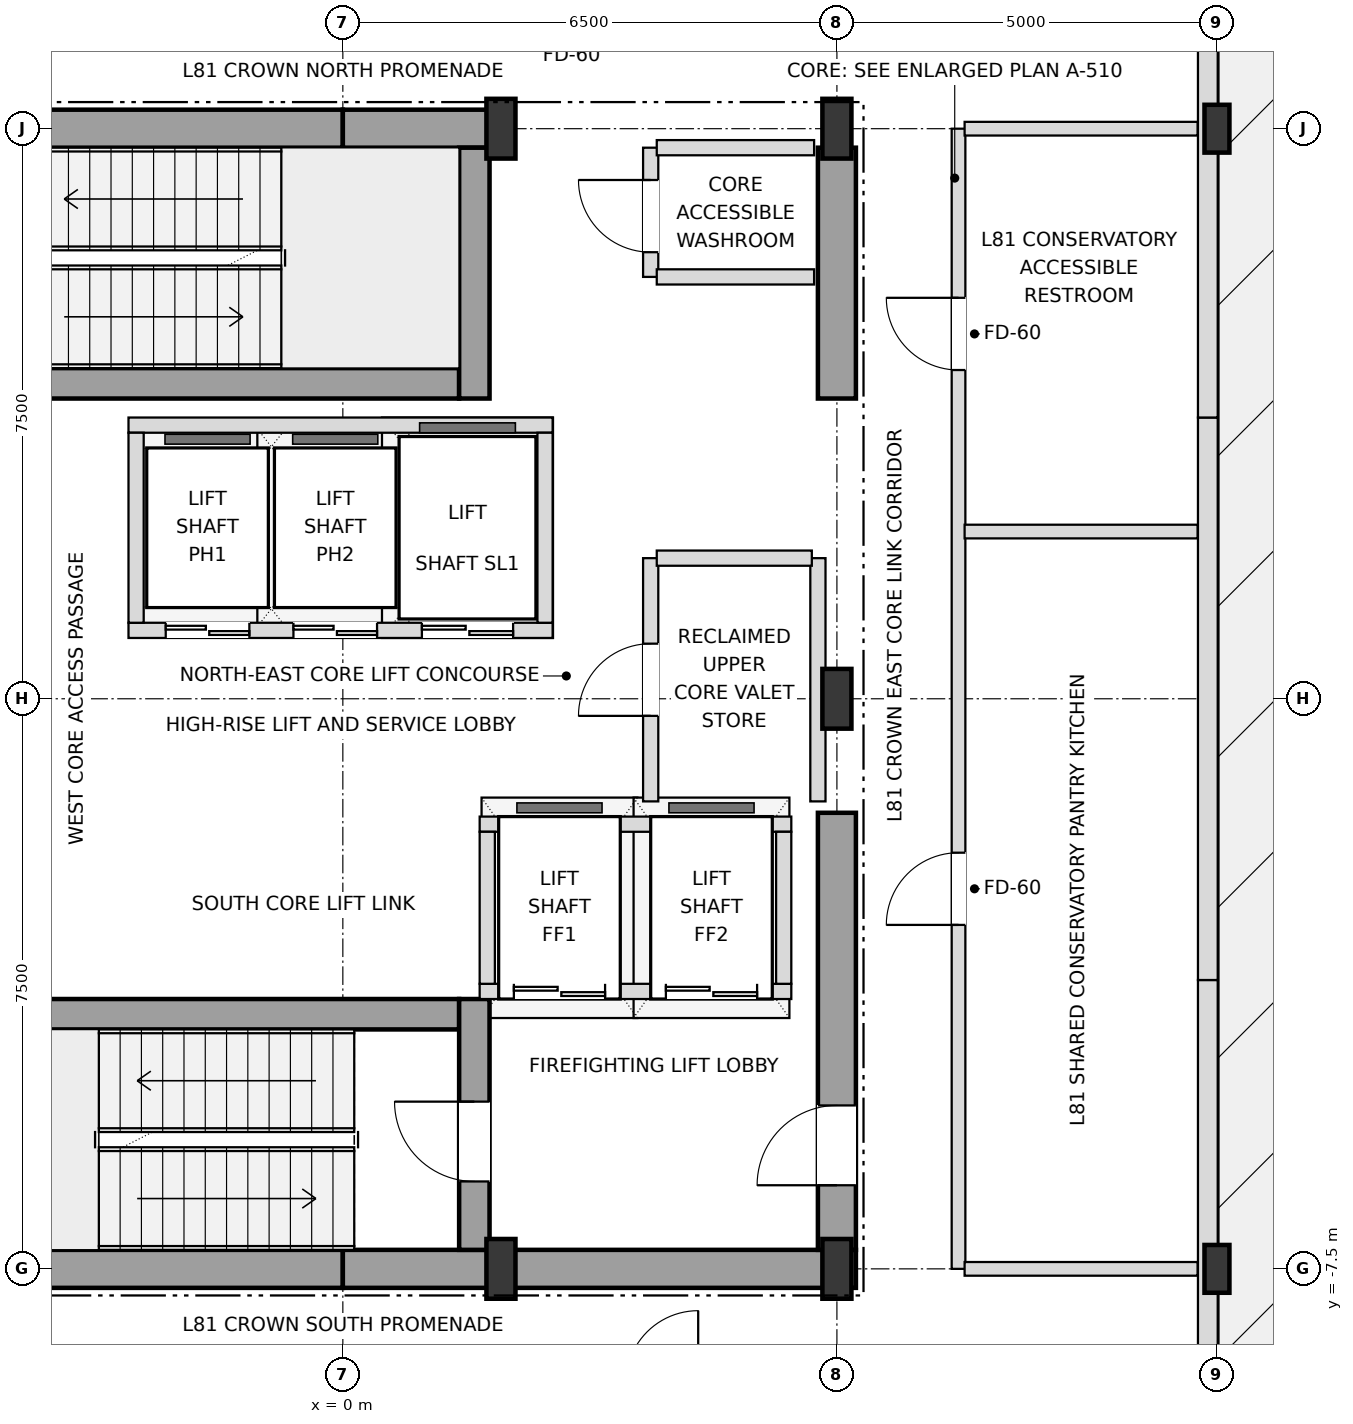
"""IFC4 building model, lengths in metres.
Left out: names, types, materials, properties, quantities, classifications, styles, units other than length and angle.
Written with IfcOpenShell. Run it as: python <this file> out.ifc"""

import sys

from ifc_helpers import new_model, si_unit, direction, frame, frame_2d, origin, origin_2d, place, context, subcontext, project, spatial, rectangle, i_section, extrude, element, fill, save


model = new_model("IFC4")
c1 = context("Model", 3, precision=1e-05, world=origin(), true_north=direction((0.0, 1.0)))
c2 = subcontext(c1, "Body", "Model", "MODEL_VIEW")
j1 = project(units=[si_unit("LENGTHUNIT", "METRE"), si_unit("PLANEANGLEUNIT", "RADIAN")], contexts=[c1])
p1 = place(None, origin())
s1 = spatial("IfcSite", under=j1, at=p1, CompositionType="ELEMENT")
p2 = place(p1, origin())
s2 = spatial("IfcBuilding", under=s1, at=p2, CompositionType="ELEMENT")
p3 = place(p2, frame((0.0, 0.0, 309.9)))
s3 = spatial("IfcBuildingStorey", under=s2, at=p3, CompositionType="ELEMENT", Elevation=309.9)
for number, where, z_axis, x_axis in (
    (1, (2.08, -7.5, 0.0), (0.0, 0.0, 1.0), (1.0, 0.0, 0.0)),
    (2, (6.5, -7.5, 0.0), (0.0, 0.0, 1.0), (1.0, 0.0, 0.0)),
    (3, (6.5, 0.0, 0.0), (0.0, 0.0, 1.0), (1.0, 0.0, 0.0)),
    (4, (2.08, 7.5, 0.0), (0.0, 0.0, 1.0), (1.0, 0.0, 0.0)),
    (5, (6.5, 7.5, 0.0), (0.0, 0.0, 1.0), (1.0, 0.0, 0.0)),
):
    element("IfcColumn", number, at=place(p3, frame(where, z_axis=z_axis, x_axis=x_axis)), inside=s3, PredefinedType="COLUMN", context=c2, shape_type="SweptSolid", body=[
        extrude(i_section(OverallWidth=0.382, OverallDepth=0.786, WebThickness=0.02, FlangeThickness=0.033, at=origin_2d()), origin(), (0.0, 0.0, 1.0), 4.5),
    ])
for number, where, z_axis, x_axis in (
    (6, (11.5, -7.5, 0.0), (0.0, 0.0, 1.0), (1.0, 0.0, 0.0)),
    (7, (11.5, 7.5, 0.0), (0.0, 0.0, 1.0), (1.0, 0.0, 0.0)),
):
    element("IfcColumn", number, at=place(p3, frame(where, z_axis=z_axis, x_axis=x_axis)), inside=s3, PredefinedType="COLUMN", context=c2, shape_type="SweptSolid", body=[
        extrude(i_section(OverallWidth=0.328, OverallDepth=0.629, WebThickness=0.014, FlangeThickness=0.021, at=origin_2d()), origin(), (0.0, 0.0, 1.0), 4.5),
    ])
p4 = place(p3, frame((11.38, -11.2, 0.0), z_axis=(0.0, 0.0, 1.0), x_axis=(0.0, 1.0, 0.0)))
e8 = element("IfcWall", 8, at=p4, inside=s3, PredefinedType="SOLIDWALL", context=c2, shape_type="SweptSolid", body=[
    extrude(rectangle(XDim=7.5, YDim=0.26, at=frame_2d((3.75, 0.0))), origin(), (0.0, 0.0, 1.0), 3.918),
])
p5 = place(p3, frame((11.38, -3.7, 0.0), z_axis=(0.0, 0.0, 1.0), x_axis=(0.0, 1.0, 0.0)))
e9 = element("IfcWall", 9, at=p5, inside=s3, PredefinedType="SOLIDWALL", context=c2, shape_type="SweptSolid", body=[
    extrude(rectangle(XDim=7.4, YDim=0.26, at=frame_2d((3.7, 0.0))), origin(), (0.0, 0.0, 1.0), 3.918),
])
p6 = place(p3, frame((11.38, 3.7, 0.0), z_axis=(0.0, 0.0, 1.0), x_axis=(0.0, 1.0, 0.0)))
e10 = element("IfcWall", 10, at=p6, inside=s3, PredefinedType="SOLIDWALL", context=c2, shape_type="SweptSolid", body=[
    extrude(rectangle(XDim=7.5, YDim=0.26, at=frame_2d((3.75, 0.0))), origin(), (0.0, 0.0, 1.0), 3.918),
])
for number, where, z_axis, x_axis in (
    (11, (-6.75, -7.5, 0.0), (0.0, 0.0, 1.0), (1.0, 0.0, 0.0)),
    (12, (0.0, -7.5, 0.0), (0.0, 0.0, 1.0), (1.0, 0.0, 0.0)),
):
    element("IfcWall", number, at=place(p3, frame(where, z_axis=z_axis, x_axis=x_axis)), inside=s3, PredefinedType="SHEAR", context=c2, shape_type="SweptSolid", body=[
        extrude(rectangle(XDim=6.75, YDim=0.5, at=frame_2d((3.375, 0.0))), origin(), (0.0, 0.0, 1.0), 4.25),
    ])
p7 = place(p3, frame((-6.75, 7.5, 0.0), z_axis=(0.0, 0.0, 1.0), x_axis=(1.0, 0.0, 0.0)))
e13 = element("IfcWall", 13, at=p7, inside=s3, PredefinedType="SHEAR", context=c2, shape_type="SweptSolid", body=[
    extrude(rectangle(XDim=6.75, YDim=0.5, at=frame_2d((3.375, 0.0))), origin(), (0.0, 0.0, 1.0), 4.25),
])
p8 = place(p7, frame((1.65, 0.0, 0.0)))
e14 = element("IfcOpeningElement", 14, at=p8, cuts=e13, PredefinedType="OPENING", context=c2, shape_type="SweptSolid", body=[
    extrude(rectangle(XDim=1.05, YDim=2.15, at=frame_2d((0.525, 1.075))), frame((0.0, 0.26, 0.0), z_axis=(0.0, -1.0, 0.0), x_axis=(1.0, 0.0, 0.0)), (0.0, 0.0, 1.0), 0.52),
])
p9 = place(p3, frame((0.0, 7.5, 0.0), z_axis=(0.0, 0.0, 1.0), x_axis=(1.0, 0.0, 0.0)))
e15 = element("IfcWall", 15, at=p9, inside=s3, PredefinedType="SHEAR", context=c2, shape_type="SweptSolid", body=[
    extrude(rectangle(XDim=2.08, YDim=0.5, at=frame_2d((1.04, 0.0))), origin(), (0.0, 0.0, 1.0), 4.25),
])
p10 = place(p3, frame((6.5, -7.25, 0.0), z_axis=(0.0, 0.0, 1.0), x_axis=(0.0, 1.0, 0.0)))
e16 = element("IfcWall", 16, at=p10, inside=s3, PredefinedType="SHEAR", context=c2, shape_type="SweptSolid", body=[
    extrude(rectangle(XDim=5.75, YDim=0.5, at=frame_2d((2.875, 0.0))), origin(), (0.0, 0.0, 1.0), 4.25),
])
p11 = place(p10, frame((0.85, 0.0, 0.0)))
e17 = element("IfcOpeningElement", 17, at=p11, cuts=e16, PredefinedType="OPENING", context=c2, shape_type="SweptSolid", body=[
    extrude(rectangle(XDim=1.05, YDim=2.15, at=frame_2d((0.525, 1.075))), frame((0.0, 0.26, 0.0), z_axis=(0.0, -1.0, 0.0), x_axis=(1.0, 0.0, 0.0)), (0.0, 0.0, 1.0), 0.52),
])
p12 = place(p3, frame((6.5, 3.95, 0.0), z_axis=(0.0, 0.0, 1.0), x_axis=(0.0, 1.0, 0.0)))
e18 = element("IfcWall", 18, at=p12, inside=s3, PredefinedType="SHEAR", context=c2, shape_type="SweptSolid", body=[
    extrude(rectangle(XDim=3.3, YDim=0.5, at=frame_2d((1.65, 0.0))), origin(), (0.0, 0.0, 1.0), 4.25),
])
p13 = place(p3, frame((-6.25, -4.15, 0.0), z_axis=(0.0, 0.0, 1.0), x_axis=(1.0, 0.0, 0.0)))
e19 = element("IfcWall", 19, at=p13, inside=s3, PredefinedType="SHEAR", context=c2, shape_type="SweptSolid", body=[
    extrude(rectangle(XDim=7.78, YDim=0.4, at=frame_2d((3.89, 0.0))), origin(), (0.0, 0.0, 1.0), 4.25),
])
p14 = place(p3, frame((1.73, -7.25, 0.0), z_axis=(0.0, 0.0, 1.0), x_axis=(0.0, 1.0, 0.0)))
e20 = element("IfcWall", 20, at=p14, inside=s3, PredefinedType="SHEAR", context=c2, shape_type="SweptSolid", body=[
    extrude(rectangle(XDim=3.3, YDim=0.4, at=frame_2d((1.65, 0.0))), origin(), (0.0, 0.0, 1.0), 4.25),
])
p15 = place(p14, frame((0.9, 0.0, 0.0)))
e21 = element("IfcOpeningElement", 21, at=p15, cuts=e20, PredefinedType="OPENING", context=c2, shape_type="SweptSolid", body=[
    extrude(rectangle(XDim=1.05, YDim=2.15, at=frame_2d((0.525, 1.075))), frame((0.0, 0.21, 0.0), z_axis=(0.0, -1.0, 0.0), x_axis=(1.0, 0.0, 0.0)), (0.0, 0.0, 1.0), 0.42),
])
p16 = place(p3, frame((-5.55, 4.15, 0.0), z_axis=(0.0, 0.0, 1.0), x_axis=(1.0, 0.0, 0.0)))
e22 = element("IfcWall", 22, at=p16, inside=s3, PredefinedType="SHEAR", context=c2, shape_type="SweptSolid", body=[
    extrude(rectangle(XDim=7.08, YDim=0.4, at=frame_2d((3.54, 0.0))), origin(), (0.0, 0.0, 1.0), 4.25),
])
p17 = place(p3, frame((1.73, 3.95, 0.0), z_axis=(0.0, 0.0, 1.0), x_axis=(0.0, 1.0, 0.0)))
e23 = element("IfcWall", 23, at=p17, inside=s3, PredefinedType="SHEAR", context=c2, shape_type="SweptSolid", body=[
    extrude(rectangle(XDim=3.3, YDim=0.4, at=frame_2d((1.65, 0.0))), origin(), (0.0, 0.0, 1.0), 4.25),
])
p18 = place(p3, frame((-2.82, 0.9, 0.0), z_axis=(0.0, 0.0, 1.0), x_axis=(1.0, 0.0, 0.0)))
e24 = element("IfcWall", 24, at=p18, inside=s3, PredefinedType="SOLIDWALL", context=c2, shape_type="SweptSolid", body=[
    extrude(rectangle(XDim=5.58, YDim=0.2, at=frame_2d((2.79, 0.0))), origin(), (0.0, 0.0, 1.0), 4.25),
])
p19 = place(p18, frame((0.49, 0.0, 0.0)))
e25 = element("IfcOpeningElement", 25, at=p19, cuts=e24, PredefinedType="OPENING", context=c2, shape_type="SweptSolid", body=[
    extrude(rectangle(XDim=1.1, YDim=2.15, at=frame_2d((0.55, 1.075))), frame((0.0, 0.11, 0.0), z_axis=(0.0, -1.0, 0.0), x_axis=(1.0, 0.0, 0.0)), (0.0, 0.0, 1.0), 0.22),
])
p20 = place(p18, frame((2.17, 0.0, 0.0)))
e26 = element("IfcOpeningElement", 26, at=p20, cuts=e24, PredefinedType="OPENING", context=c2, shape_type="SweptSolid", body=[
    extrude(rectangle(XDim=1.1, YDim=2.15, at=frame_2d((0.55, 1.075))), frame((0.0, 0.11, 0.0), z_axis=(0.0, -1.0, 0.0), x_axis=(1.0, 0.0, 0.0)), (0.0, 0.0, 1.0), 0.22),
])
p21 = place(p18, frame((3.86, 0.0, 0.0)))
e27 = element("IfcOpeningElement", 27, at=p21, cuts=e24, PredefinedType="OPENING", context=c2, shape_type="SweptSolid", body=[
    extrude(rectangle(XDim=1.2, YDim=2.2, at=frame_2d((0.6, 1.1))), frame((0.0, 0.11, 0.0), z_axis=(0.0, -1.0, 0.0), x_axis=(1.0, 0.0, 0.0)), (0.0, 0.0, 1.0), 0.22),
])
p22 = place(p3, frame((-2.82, 3.6, 0.0), z_axis=(0.0, 0.0, 1.0), x_axis=(1.0, 0.0, 0.0)))
e28 = element("IfcWall", 28, at=p22, inside=s3, PredefinedType="SOLIDWALL", context=c2, shape_type="SweptSolid", body=[
    extrude(rectangle(XDim=5.58, YDim=0.2, at=frame_2d((2.79, 0.0))), origin(), (0.0, 0.0, 1.0), 4.25),
])
for number, where, z_axis, x_axis in (
    (29, (-2.72, 1.0, 0.0), (0.0, 0.0, 1.0), (0.0, 1.0, 0.0)),
    (30, (2.66, 1.0, 0.0), (0.0, 0.0, 1.0), (0.0, 1.0, 0.0)),
):
    element("IfcWall", number, at=place(p3, frame(where, z_axis=z_axis, x_axis=x_axis)), inside=s3, PredefinedType="SOLIDWALL", context=c2, shape_type="SweptSolid", body=[
        extrude(rectangle(XDim=2.5, YDim=0.2, at=frame_2d((1.25, 0.0))), origin(), (0.0, 0.0, 1.0), 4.25),
    ])
p23 = place(p3, frame((1.8, -3.85, 0.0), z_axis=(0.0, 0.0, 1.0), x_axis=(1.0, 0.0, 0.0)))
e31 = element("IfcWall", 31, at=p23, inside=s3, PredefinedType="SOLIDWALL", context=c2, shape_type="SweptSolid", body=[
    extrude(rectangle(XDim=4.1, YDim=0.2, at=frame_2d((2.05, 0.0))), origin(), (0.0, 0.0, 1.0), 4.25),
])
p24 = place(p23, frame((0.45, 0.0, 0.0)))
e32 = element("IfcOpeningElement", 32, at=p24, cuts=e31, PredefinedType="OPENING", context=c2, shape_type="SweptSolid", body=[
    extrude(rectangle(XDim=1.2, YDim=2.2, at=frame_2d((0.6, 1.1))), frame((0.0, 0.11, 0.0), z_axis=(0.0, -1.0, 0.0), x_axis=(1.0, 0.0, 0.0)), (0.0, 0.0, 1.0), 0.22),
])
p25 = place(p23, frame((2.45, 0.0, 0.0)))
e33 = element("IfcOpeningElement", 33, at=p25, cuts=e31, PredefinedType="OPENING", context=c2, shape_type="SweptSolid", body=[
    extrude(rectangle(XDim=1.2, YDim=2.2, at=frame_2d((0.6, 1.1))), frame((0.0, 0.11, 0.0), z_axis=(0.0, -1.0, 0.0), x_axis=(1.0, 0.0, 0.0)), (0.0, 0.0, 1.0), 0.22),
])
p26 = place(p3, frame((1.8, -1.65, 0.0), z_axis=(0.0, 0.0, 1.0), x_axis=(1.0, 0.0, 0.0)))
e34 = element("IfcWall", 34, at=p26, inside=s3, PredefinedType="SOLIDWALL", context=c2, shape_type="SweptSolid", body=[
    extrude(rectangle(XDim=4.1, YDim=0.2, at=frame_2d((2.05, 0.0))), origin(), (0.0, 0.0, 1.0), 4.25),
])
for number, where, z_axis, x_axis in (
    (35, (1.9, -3.75, 0.0), (0.0, 0.0, 1.0), (0.0, 1.0, 0.0)),
    (36, (5.8, -3.75, 0.0), (0.0, 0.0, 1.0), (0.0, 1.0, 0.0)),
):
    element("IfcWall", number, at=place(p3, frame(where, z_axis=z_axis, x_axis=x_axis)), inside=s3, PredefinedType="SOLIDWALL", context=c2, shape_type="SweptSolid", body=[
        extrude(rectangle(XDim=2.0, YDim=0.2, at=frame_2d((1.0, 0.0))), origin(), (0.0, 0.0, 1.0), 4.25),
    ])
p27 = place(p3, frame((4.05, -1.35, 0.0), z_axis=(0.0, 0.0, 1.0), x_axis=(0.0, 1.0, 0.0)))
e37 = element("IfcWall", 37, at=p27, inside=s3, PredefinedType="SOLIDWALL", context=c2, shape_type="SweptSolid", body=[
    extrude(rectangle(XDim=3.2, YDim=0.2, at=frame_2d((1.6, 0.0))), origin(), (0.0, 0.0, 1.0), 4.25),
])
p28 = place(p27, frame((1.125, 0.0, 0.0)))
e38 = element("IfcOpeningElement", 38, at=p28, cuts=e37, PredefinedType="OPENING", context=c2, shape_type="SweptSolid", body=[
    extrude(rectangle(XDim=0.95, YDim=2.15, at=frame_2d((0.475, 1.075))), frame((0.0, 0.11, 0.0), z_axis=(0.0, -1.0, 0.0), x_axis=(1.0, 0.0, 0.0)), (0.0, 0.0, 1.0), 0.22),
])
p29 = place(p3, frame((4.05, 5.55, 0.0), z_axis=(0.0, 0.0, 1.0), x_axis=(0.0, 1.0, 0.0)))
e39 = element("IfcWall", 39, at=p29, inside=s3, PredefinedType="SOLIDWALL", context=c2, shape_type="SweptSolid", body=[
    extrude(rectangle(XDim=1.7, YDim=0.2, at=frame_2d((0.85, 0.0))), origin(), (0.0, 0.0, 1.0), 4.25),
])
p30 = place(p29, frame((0.325, 0.0, 0.0)))
e40 = element("IfcOpeningElement", 40, at=p30, cuts=e39, PredefinedType="OPENING", context=c2, shape_type="SweptSolid", body=[
    extrude(rectangle(XDim=0.95, YDim=2.15, at=frame_2d((0.475, 1.075))), frame((0.0, 0.11, 0.0), z_axis=(0.0, -1.0, 0.0), x_axis=(1.0, 0.0, 0.0)), (0.0, 0.0, 1.0), 0.22),
])
p31 = place(p3, frame((6.25, -1.35, 0.0), z_axis=(0.0, 0.0, 1.0), x_axis=(0.0, 1.0, 0.0)))
e41 = element("IfcWall", 41, at=p31, inside=s3, PredefinedType="SOLIDWALL", context=c2, shape_type="SweptSolid", body=[
    extrude(rectangle(XDim=3.2, YDim=0.2, at=frame_2d((1.6, 0.0))), origin(), (0.0, 0.0, 1.0), 4.25),
])
p32 = place(p3, frame((8.1, -7.5, 0.0), z_axis=(0.0, 0.0, 1.0), x_axis=(0.0, 1.0, 0.0)))
e42 = element("IfcWall", 42, at=p32, inside=s3, PredefinedType="PARTITIONING", context=c2, shape_type="SweptSolid", body=[
    extrude(rectangle(XDim=15.0, YDim=0.18, at=frame_2d((7.5, 0.0))), origin(), (0.0, 0.0, 1.0), 4.25),
])
p33 = place(p32, frame((4.525, 0.0, 0.0)))
e43 = element("IfcOpeningElement", 43, at=p33, cuts=e42, PredefinedType="OPENING", context=c2, shape_type="SweptSolid", body=[
    extrude(rectangle(XDim=0.95, YDim=2.15, at=frame_2d((0.475, 1.075))), frame((0.0, 0.1, 0.0), z_axis=(0.0, -1.0, 0.0), x_axis=(1.0, 0.0, 0.0)), (0.0, 0.0, 1.0), 0.2),
])
p34 = place(p32, frame((11.825, 0.0, 0.0)))
e44 = element("IfcOpeningElement", 44, at=p34, cuts=e42, PredefinedType="OPENING", context=c2, shape_type="SweptSolid", body=[
    extrude(rectangle(XDim=0.95, YDim=2.15, at=frame_2d((0.475, 1.075))), frame((0.0, 0.1, 0.0), z_axis=(0.0, -1.0, 0.0), x_axis=(1.0, 0.0, 0.0)), (0.0, 0.0, 1.0), 0.2),
])
p35 = place(p3, frame((8.18, -7.5, 0.0), z_axis=(0.0, 0.0, 1.0), x_axis=(1.0, 0.0, 0.0)))
e45 = element("IfcWall", 45, at=p35, inside=s3, PredefinedType="PARTITIONING", context=c2, shape_type="SweptSolid", body=[
    extrude(rectangle(XDim=3.065, YDim=0.18, at=frame_2d((1.533, 0.0))), origin(), (0.0, 0.0, 1.0), 3.918),
])
p36 = place(p3, frame((4.13, 1.85, 0.0), z_axis=(0.0, 0.0, 1.0), x_axis=(1.0, 0.0, 0.0)))
e46 = element("IfcWall", 46, at=p36, inside=s3, PredefinedType="SOLIDWALL", context=c2, shape_type="SweptSolid", body=[
    extrude(rectangle(XDim=2.04, YDim=0.2, at=frame_2d((1.02, 0.0))), origin(), (0.0, 0.0, 1.0), 4.25),
])
p37 = place(p3, frame((8.18, 2.2, 0.0), z_axis=(0.0, 0.0, 1.0), x_axis=(1.0, 0.0, 0.0)))
e47 = element("IfcWall", 47, at=p37, inside=s3, PredefinedType="PARTITIONING", context=c2, shape_type="SweptSolid", body=[
    extrude(rectangle(XDim=3.065, YDim=0.18, at=frame_2d((1.533, 0.0))), origin(), (0.0, 0.0, 1.0), 4.25),
])
for number, where, z_axis, x_axis in (
    (48, (4.13, 5.55, 0.0), (0.0, 0.0, 1.0), (1.0, 0.0, 0.0)),
    (49, (4.13, 7.25, 0.0), (0.0, 0.0, 1.0), (1.0, 0.0, 0.0)),
):
    element("IfcWall", number, at=place(p3, frame(where, z_axis=z_axis, x_axis=x_axis)), inside=s3, PredefinedType="SOLIDWALL", context=c2, shape_type="SweptSolid", body=[
        extrude(rectangle(XDim=2.07, YDim=0.2, at=frame_2d((1.035, 0.0))), origin(), (0.0, 0.0, 1.0), 4.25),
    ])
p38 = place(p3, frame((8.18, 7.5, 0.0), z_axis=(0.0, 0.0, 1.0), x_axis=(1.0, 0.0, 0.0)))
e50 = element("IfcWall", 50, at=p38, inside=s3, PredefinedType="PARTITIONING", context=c2, shape_type="SweptSolid", body=[
    extrude(rectangle(XDim=3.065, YDim=0.18, at=frame_2d((1.533, 0.0))), origin(), (0.0, 0.0, 1.0), 3.918),
])
p39 = place(p11, origin())
e51 = element("IfcDoor", 51, at=p39, inside=s3, OperationType="SINGLE_SWING_LEFT", PredefinedType="DOOR", context=c2, shape_type="SweptSolid", body=[
    extrude(rectangle(XDim=1.05, YDim=2.15, at=frame_2d((0.525, 1.075))), frame((0.0, 0.025, 0.0), z_axis=(0.0, -1.0, 0.0), x_axis=(1.0, 0.0, 0.0)), (0.0, 0.0, 1.0), 0.05),
])
fill(e17, e51)
p40 = place(p15, origin())
e52 = element("IfcDoor", 52, at=p40, inside=s3, OperationType="SINGLE_SWING_RIGHT", PredefinedType="DOOR", context=c2, shape_type="SweptSolid", body=[
    extrude(rectangle(XDim=1.05, YDim=2.15, at=frame_2d((0.525, 1.075))), frame((0.0, 0.025, 0.0), z_axis=(0.0, -1.0, 0.0), x_axis=(1.0, 0.0, 0.0)), (0.0, 0.0, 1.0), 0.05),
])
fill(e21, e52)
p41 = place(p19, origin())
e53 = element("IfcDoor", 53, at=p41, inside=s3, OperationType="DOUBLE_DOOR_SLIDING", PredefinedType="DOOR", context=c2, shape_type="SweptSolid", body=[
    extrude(rectangle(XDim=1.1, YDim=2.15, at=frame_2d((0.55, 1.075))), frame((0.0, 0.025, 0.0), z_axis=(0.0, -1.0, 0.0), x_axis=(1.0, 0.0, 0.0)), (0.0, 0.0, 1.0), 0.05),
])
fill(e25, e53)
p42 = place(p20, origin())
e54 = element("IfcDoor", 54, at=p42, inside=s3, OperationType="DOUBLE_DOOR_SLIDING", PredefinedType="DOOR", context=c2, shape_type="SweptSolid", body=[
    extrude(rectangle(XDim=1.1, YDim=2.15, at=frame_2d((0.55, 1.075))), frame((0.0, 0.025, 0.0), z_axis=(0.0, -1.0, 0.0), x_axis=(1.0, 0.0, 0.0)), (0.0, 0.0, 1.0), 0.05),
])
fill(e26, e54)
p43 = place(p21, origin())
e55 = element("IfcDoor", 55, at=p43, inside=s3, OperationType="DOUBLE_DOOR_SLIDING", PredefinedType="DOOR", context=c2, shape_type="SweptSolid", body=[
    extrude(rectangle(XDim=1.2, YDim=2.2, at=frame_2d((0.6, 1.1))), frame((0.0, 0.025, 0.0), z_axis=(0.0, -1.0, 0.0), x_axis=(1.0, 0.0, 0.0)), (0.0, 0.0, 1.0), 0.05),
])
fill(e27, e55)
p44 = place(p24, origin())
e56 = element("IfcDoor", 56, at=p44, inside=s3, OperationType="DOUBLE_DOOR_SLIDING", PredefinedType="DOOR", context=c2, shape_type="SweptSolid", body=[
    extrude(rectangle(XDim=1.2, YDim=2.2, at=frame_2d((0.6, 1.1))), frame((0.0, 0.025, 0.0), z_axis=(0.0, -1.0, 0.0), x_axis=(1.0, 0.0, 0.0)), (0.0, 0.0, 1.0), 0.05),
])
fill(e32, e56)
p45 = place(p25, origin())
e57 = element("IfcDoor", 57, at=p45, inside=s3, OperationType="DOUBLE_DOOR_SLIDING", PredefinedType="DOOR", context=c2, shape_type="SweptSolid", body=[
    extrude(rectangle(XDim=1.2, YDim=2.2, at=frame_2d((0.6, 1.1))), frame((0.0, 0.025, 0.0), z_axis=(0.0, -1.0, 0.0), x_axis=(1.0, 0.0, 0.0)), (0.0, 0.0, 1.0), 0.05),
])
fill(e33, e57)
p46 = place(p28, origin())
e58 = element("IfcDoor", 58, at=p46, inside=s3, OperationType="SINGLE_SWING_LEFT", PredefinedType="DOOR", context=c2, shape_type="SweptSolid", body=[
    extrude(rectangle(XDim=0.95, YDim=2.15, at=frame_2d((0.475, 1.075))), frame((0.0, 0.025, 0.0), z_axis=(0.0, -1.0, 0.0), x_axis=(1.0, 0.0, 0.0)), (0.0, 0.0, 1.0), 0.05),
])
fill(e38, e58)
p47 = place(p30, origin())
e59 = element("IfcDoor", 59, at=p47, inside=s3, OperationType="SINGLE_SWING_RIGHT", PredefinedType="DOOR", context=c2, shape_type="SweptSolid", body=[
    extrude(rectangle(XDim=0.95, YDim=2.15, at=frame_2d((0.475, 1.075))), frame((0.0, 0.025, 0.0), z_axis=(0.0, -1.0, 0.0), x_axis=(1.0, 0.0, 0.0)), (0.0, 0.0, 1.0), 0.05),
])
fill(e40, e59)
p48 = place(p33, origin())
e60 = element("IfcDoor", 60, at=p48, inside=s3, OperationType="SINGLE_SWING_LEFT", PredefinedType="DOOR", context=c2, shape_type="SweptSolid", body=[
    extrude(rectangle(XDim=0.95, YDim=2.15, at=frame_2d((0.475, 1.075))), frame((0.0, 0.025, 0.0), z_axis=(0.0, -1.0, 0.0), x_axis=(1.0, 0.0, 0.0)), (0.0, 0.0, 1.0), 0.05),
])
fill(e43, e60)
p49 = place(p34, origin())
e61 = element("IfcDoor", 61, at=p49, inside=s3, OperationType="SINGLE_SWING_RIGHT", PredefinedType="DOOR", context=c2, shape_type="SweptSolid", body=[
    extrude(rectangle(XDim=0.95, YDim=2.15, at=frame_2d((0.475, 1.075))), frame((0.0, 0.025, 0.0), z_axis=(0.0, -1.0, 0.0), x_axis=(1.0, 0.0, 0.0)), (0.0, 0.0, 1.0), 0.05),
])
fill(e44, e61)
save(model, sys.argv[1])
